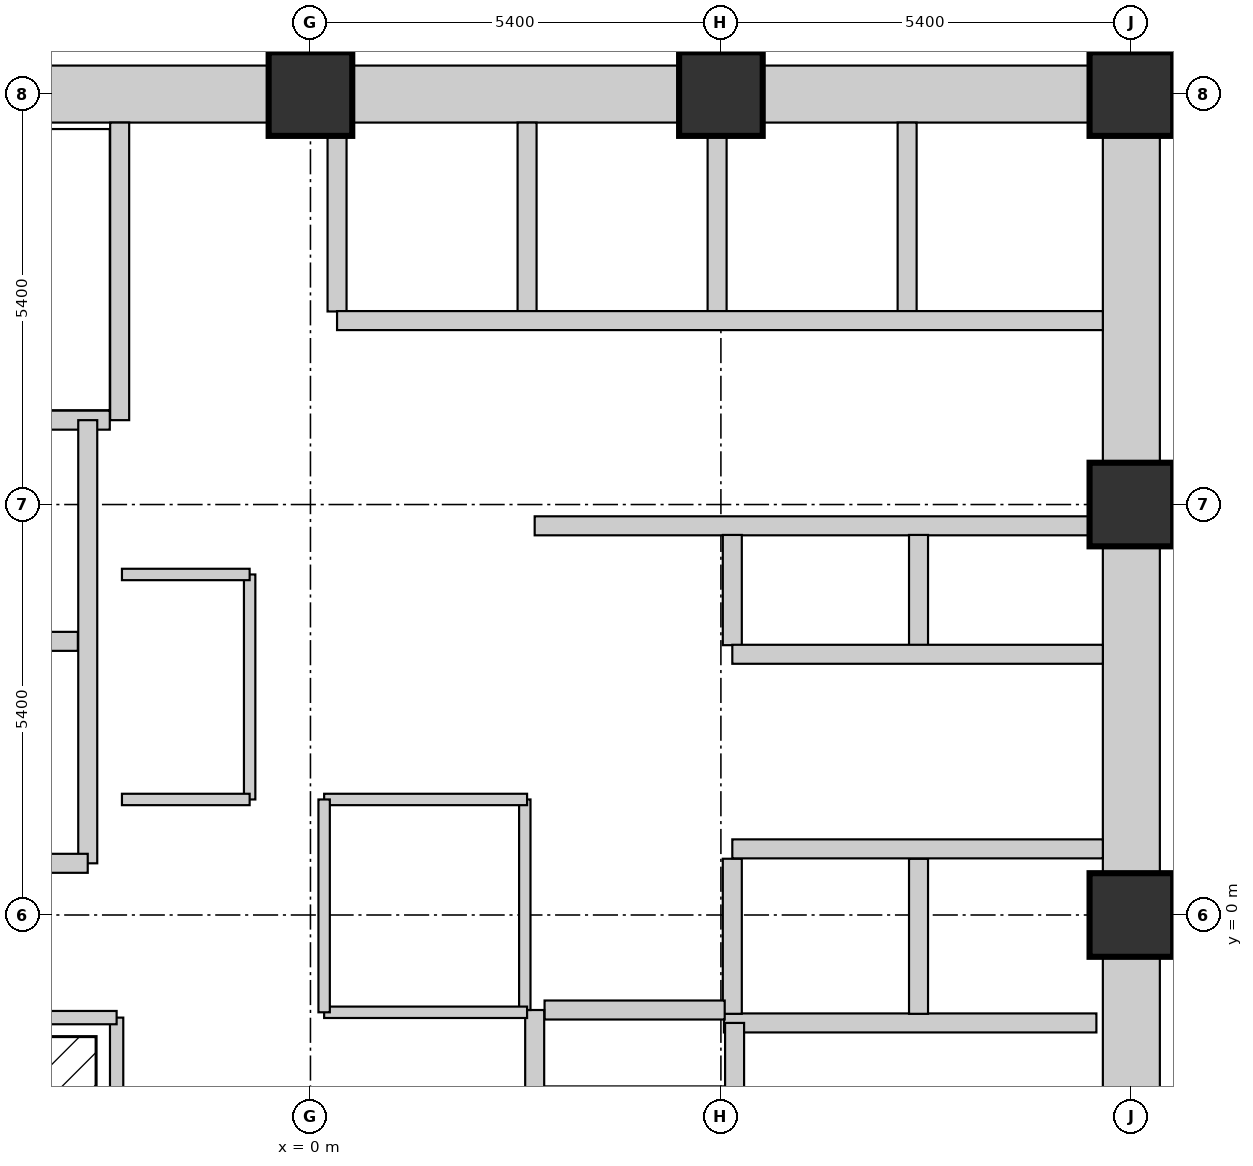
"""IFC4 building model, lengths in metres.
Left out: names, types, materials, properties, quantities, classifications, styles, units other than length and angle.
Written with IfcOpenShell. Run it as: python <this file> out.ifc"""

import sys

from ifc_helpers import new_model, si_unit, direction, frame, frame_2d, origin, origin_2d, place, context, subcontext, project, spatial, rectangle, extrude, element, fill, save


model = new_model("IFC4")
c1 = context("Model", 3, precision=1e-05, world=origin(), true_north=direction((0.0, 1.0)))
c2 = subcontext(c1, "Body", "Model", "MODEL_VIEW")
j1 = project(units=[si_unit("LENGTHUNIT", "METRE"), si_unit("PLANEANGLEUNIT", "RADIAN")], contexts=[c1])
p1 = place(None, origin())
s1 = spatial("IfcSite", under=j1, at=p1, CompositionType="ELEMENT")
p2 = place(p1, origin())
s2 = spatial("IfcBuilding", under=s1, at=p2, CompositionType="ELEMENT")
p3 = place(p2, frame((0.0, 0.0, 83.25)))
s3 = spatial("IfcBuildingStorey", under=s2, at=p3, CompositionType="ELEMENT", Elevation=83.25)
for number, where, z_axis, x_axis in (
    (1, (0.0, 10.8, 0.0), (0.0, 0.0, 1.0), (1.0, 0.0, 0.0)),
    (2, (5.4, 10.8, 0.0), (0.0, 0.0, 1.0), (1.0, 0.0, 0.0)),
    (3, (10.8, 0.0, 0.0), (0.0, 0.0, 1.0), (1.0, 0.0, 0.0)),
    (4, (10.8, 5.4, 0.0), (0.0, 0.0, 1.0), (1.0, 0.0, 0.0)),
    (5, (10.8, 10.8, 0.0), (0.0, 0.0, 1.0), (1.0, 0.0, 0.0)),
):
    element("IfcColumn", number, at=place(p3, frame(where, z_axis=z_axis, x_axis=x_axis)), inside=s3, PredefinedType="COLUMN", context=c2, shape_type="SweptSolid", body=[
        extrude(rectangle(XDim=1.1, YDim=1.1, at=origin_2d()), origin(), (0.0, 0.0, 1.0), 3.75),
    ])
p4 = place(p3, frame((-4.84, 10.8, 0.0), z_axis=(0.0, 0.0, 1.0), x_axis=(1.0, 0.0, 0.0)))
e6 = element("IfcWall", 6, at=p4, inside=s3, PredefinedType="SHEAR", context=c2, shape_type="SweptSolid", body=[
    extrude(rectangle(XDim=4.28, YDim=0.75, at=frame_2d((2.14, 0.0))), origin(), (0.0, 0.0, 1.0), 3.75),
])
p5 = place(p4, frame((2.93, 0.0, 0.0)))
e7 = element("IfcOpeningElement", 7, at=p5, cuts=e6, PredefinedType="OPENING", context=c2, shape_type="SweptSolid", body=[
    extrude(rectangle(XDim=1.1, YDim=2.1, at=frame_2d((0.55, 1.05))), frame((0.0, 0.385, 0.0), z_axis=(0.0, -1.0, 0.0), x_axis=(1.0, 0.0, 0.0)), (0.0, 0.0, 1.0), 0.77),
])
p6 = place(p3, frame((10.8, -4.84, 0.0), z_axis=(0.0, 0.0, 1.0), x_axis=(0.0, 1.0, 0.0)))
e8 = element("IfcWall", 8, at=p6, inside=s3, PredefinedType="SHEAR", context=c2, shape_type="SweptSolid", body=[
    extrude(rectangle(XDim=4.28, YDim=0.75, at=frame_2d((2.14, 0.0))), origin(), (0.0, 0.0, 1.0), 3.75),
])
p7 = place(p6, frame((1.59, 0.0, 0.0)))
e9 = element("IfcOpeningElement", 9, at=p7, cuts=e8, PredefinedType="OPENING", context=c2, shape_type="SweptSolid", body=[
    extrude(rectangle(XDim=1.1, YDim=2.1, at=frame_2d((0.55, 1.05))), frame((0.0, 0.385, 0.0), z_axis=(0.0, -1.0, 0.0), x_axis=(1.0, 0.0, 0.0)), (0.0, 0.0, 1.0), 0.77),
])
p8 = place(p3, frame((0.56, 10.8, 0.0), z_axis=(0.0, 0.0, 1.0), x_axis=(1.0, 0.0, 0.0)))
e10 = element("IfcWall", 10, at=p8, inside=s3, PredefinedType="SHEAR", context=c2, shape_type="SweptSolid", body=[
    extrude(rectangle(XDim=4.28, YDim=0.75, at=frame_2d((2.14, 0.0))), origin(), (0.0, 0.0, 1.0), 3.75),
])
p9 = place(p3, frame((10.8, 0.56, 0.0), z_axis=(0.0, 0.0, 1.0), x_axis=(0.0, 1.0, 0.0)))
e11 = element("IfcWall", 11, at=p9, inside=s3, PredefinedType="SHEAR", context=c2, shape_type="SweptSolid", body=[
    extrude(rectangle(XDim=4.28, YDim=0.75, at=frame_2d((2.14, 0.0))), origin(), (0.0, 0.0, 1.0), 3.75),
])
p10 = place(p9, frame((1.59, 0.0, 0.0)))
e12 = element("IfcOpeningElement", 12, at=p10, cuts=e11, PredefinedType="OPENING", context=c2, shape_type="SweptSolid", body=[
    extrude(rectangle(XDim=1.1, YDim=2.1, at=frame_2d((0.55, 1.05))), frame((0.0, 0.385, 0.0), z_axis=(0.0, -1.0, 0.0), x_axis=(1.0, 0.0, 0.0)), (0.0, 0.0, 1.0), 0.77),
])
for number, where, z_axis, x_axis in (
    (13, (5.96, 10.8, 0.0), (0.0, 0.0, 1.0), (1.0, 0.0, 0.0)),
    (14, (10.8, 5.96, 0.0), (0.0, 0.0, 1.0), (0.0, 1.0, 0.0)),
):
    element("IfcWall", number, at=place(p3, frame(where, z_axis=z_axis, x_axis=x_axis)), inside=s3, PredefinedType="SHEAR", context=c2, shape_type="SweptSolid", body=[
        extrude(rectangle(XDim=4.28, YDim=0.75, at=frame_2d((2.14, 0.0))), origin(), (0.0, 0.0, 1.0), 3.75),
    ])
p11 = place(p3, frame((5.44, -1.42, 0.0), z_axis=(0.0, 0.0, 1.0), x_axis=(1.0, 0.0, 0.0)))
e15 = element("IfcWall", 15, at=p11, inside=s3, PredefinedType="SHEAR", context=c2, shape_type="SweptSolid", body=[
    extrude(rectangle(XDim=4.9, YDim=0.25, at=frame_2d((2.45, 0.0))), origin(), (0.0, 0.0, 1.0), 3.75),
])
p12 = place(p3, frame((5.58, -6.51, 0.0), z_axis=(0.0, 0.0, 1.0), x_axis=(0.0, 1.0, 0.0)))
e16 = element("IfcWall", 16, at=p12, inside=s3, PredefinedType="SHEAR", context=c2, shape_type="SweptSolid", body=[
    extrude(rectangle(XDim=5.09, YDim=0.25, at=frame_2d((2.545, 0.0))), origin(), (0.0, 0.0, 1.0), 3.75),
])
p13 = place(p12, frame((0.85, 0.0, 0.0)))
e17 = element("IfcOpeningElement", 17, at=p13, cuts=e16, PredefinedType="OPENING", context=c2, shape_type="SweptSolid", body=[
    extrude(rectangle(XDim=1.1, YDim=2.1, at=frame_2d((0.55, 1.05))), frame((0.0, 0.135, 0.0), z_axis=(0.0, -1.0, 0.0), x_axis=(1.0, 0.0, 0.0)), (0.0, 0.0, 1.0), 0.27),
])
p14 = place(p3, frame((2.85, 7.94, 0.0), z_axis=(0.0, 0.0, 1.0), x_axis=(0.0, 1.0, 0.0)))
e18 = element("IfcWall", 18, at=p14, inside=s3, PredefinedType="SHEAR", context=c2, shape_type="SweptSolid", body=[
    extrude(rectangle(XDim=2.485, YDim=0.25, at=frame_2d((1.243, 0.0))), origin(), (0.0, 0.0, 1.0), 3.75),
])
for number, where, z_axis, x_axis in (
    (19, (0.35, 7.94, 0.0), (0.0, 0.0, 1.0), (0.0, 1.0, 0.0)),
    (20, (5.35, 7.94, 0.0), (0.0, 0.0, 1.0), (0.0, 1.0, 0.0)),
):
    element("IfcWall", number, at=place(p3, frame(where, z_axis=z_axis, x_axis=x_axis)), inside=s3, PredefinedType="SHEAR", context=c2, shape_type="SweptSolid", body=[
        extrude(rectangle(XDim=2.31, YDim=0.25, at=frame_2d((1.155, 0.0))), origin(), (0.0, 0.0, 1.0), 3.75),
    ])
p15 = place(p3, frame((7.85, 7.94, 0.0), z_axis=(0.0, 0.0, 1.0), x_axis=(0.0, 1.0, 0.0)))
e21 = element("IfcWall", 21, at=p15, inside=s3, PredefinedType="SHEAR", context=c2, shape_type="SweptSolid", body=[
    extrude(rectangle(XDim=2.485, YDim=0.25, at=frame_2d((1.243, 0.0))), origin(), (0.0, 0.0, 1.0), 3.75),
])
p16 = place(p3, frame((0.35, 7.82, 0.0), z_axis=(0.0, 0.0, 1.0), x_axis=(1.0, 0.0, 0.0)))
e22 = element("IfcWall", 22, at=p16, inside=s3, PredefinedType="SHEAR", context=c2, shape_type="SweptSolid", body=[
    extrude(rectangle(XDim=10.075, YDim=0.25, at=frame_2d((5.038, 0.0))), origin(), (0.0, 0.0, 1.0), 3.75),
])
p17 = place(p16, frame((0.7, 0.0, 0.0)))
e23 = element("IfcOpeningElement", 23, at=p17, cuts=e22, PredefinedType="OPENING", context=c2, shape_type="SweptSolid", body=[
    extrude(rectangle(XDim=1.1, YDim=2.1, at=frame_2d((0.55, 1.05))), frame((0.0, 0.135, 0.0), z_axis=(0.0, -1.0, 0.0), x_axis=(1.0, 0.0, 0.0)), (0.0, 0.0, 1.0), 0.27),
])
p18 = place(p16, frame((3.2, 0.0, 0.0)))
e24 = element("IfcOpeningElement", 24, at=p18, cuts=e22, PredefinedType="OPENING", context=c2, shape_type="SweptSolid", body=[
    extrude(rectangle(XDim=1.1, YDim=2.1, at=frame_2d((0.55, 1.05))), frame((0.0, 0.135, 0.0), z_axis=(0.0, -1.0, 0.0), x_axis=(1.0, 0.0, 0.0)), (0.0, 0.0, 1.0), 0.27),
])
p19 = place(p16, frame((5.7, 0.0, 0.0)))
e25 = element("IfcOpeningElement", 25, at=p19, cuts=e22, PredefinedType="OPENING", context=c2, shape_type="SweptSolid", body=[
    extrude(rectangle(XDim=1.1, YDim=2.1, at=frame_2d((0.55, 1.05))), frame((0.0, 0.135, 0.0), z_axis=(0.0, -1.0, 0.0), x_axis=(1.0, 0.0, 0.0)), (0.0, 0.0, 1.0), 0.27),
])
p20 = place(p16, frame((8.2, 0.0, 0.0)))
e26 = element("IfcOpeningElement", 26, at=p20, cuts=e22, PredefinedType="OPENING", context=c2, shape_type="SweptSolid", body=[
    extrude(rectangle(XDim=1.1, YDim=2.1, at=frame_2d((0.55, 1.05))), frame((0.0, 0.135, 0.0), z_axis=(0.0, -1.0, 0.0), x_axis=(1.0, 0.0, 0.0)), (0.0, 0.0, 1.0), 0.27),
])
p21 = place(p3, frame((2.95, 5.12, 0.0), z_axis=(0.0, 0.0, 1.0), x_axis=(1.0, 0.0, 0.0)))
e27 = element("IfcWall", 27, at=p21, inside=s3, PredefinedType="SHEAR", context=c2, shape_type="SweptSolid", body=[
    extrude(rectangle(XDim=7.3, YDim=0.25, at=frame_2d((3.65, 0.0))), origin(), (0.0, 0.0, 1.0), 3.75),
])
for number, where, z_axis, x_axis in (
    (28, (5.55, 3.55, 0.0), (0.0, 0.0, 1.0), (0.0, 1.0, 0.0)),
    (29, (8.0, 3.55, 0.0), (0.0, 0.0, 1.0), (0.0, 1.0, 0.0)),
):
    element("IfcWall", number, at=place(p3, frame(where, z_axis=z_axis, x_axis=x_axis)), inside=s3, PredefinedType="SHEAR", context=c2, shape_type="SweptSolid", body=[
        extrude(rectangle(XDim=1.45, YDim=0.25, at=frame_2d((0.725, 0.0))), origin(), (0.0, 0.0, 1.0), 3.75),
    ])
for number, where, z_axis, x_axis in (
    (30, (5.55, -1.3, 0.0), (0.0, 0.0, 1.0), (0.0, 1.0, 0.0)),
    (31, (8.0, -1.3, 0.0), (0.0, 0.0, 1.0), (0.0, 1.0, 0.0)),
):
    element("IfcWall", number, at=place(p3, frame(where, z_axis=z_axis, x_axis=x_axis)), inside=s3, PredefinedType="SHEAR", context=c2, shape_type="SweptSolid", body=[
        extrude(rectangle(XDim=2.04, YDim=0.25, at=frame_2d((1.02, 0.0))), origin(), (0.0, 0.0, 1.0), 3.75),
    ])
for number, where, z_axis, x_axis in (
    (32, (5.55, 3.43, 0.0), (0.0, 0.0, 1.0), (1.0, 0.0, 0.0)),
    (33, (5.55, 0.87, 0.0), (0.0, 0.0, 1.0), (1.0, 0.0, 0.0)),
):
    element("IfcWall", number, at=place(p3, frame(where, z_axis=z_axis, x_axis=x_axis)), inside=s3, PredefinedType="SHEAR", context=c2, shape_type="SweptSolid", body=[
        extrude(rectangle(XDim=4.875, YDim=0.25, at=frame_2d((2.438, 0.0))), origin(), (0.0, 0.0, 1.0), 3.75),
    ])
p22 = place(p3, frame((3.08, -1.25, 0.0), z_axis=(0.0, 0.0, 1.0), x_axis=(1.0, 0.0, 0.0)))
e34 = element("IfcWall", 34, at=p22, inside=s3, PredefinedType="SHEAR", context=c2, shape_type="SweptSolid", body=[
    extrude(rectangle(XDim=2.37, YDim=0.25, at=frame_2d((1.185, 0.0))), origin(), (0.0, 0.0, 1.0), 3.75),
])
p23 = place(p3, frame((2.95, -3.65, 0.0), z_axis=(0.0, 0.0, 1.0), x_axis=(0.0, 1.0, 0.0)))
e35 = element("IfcWall", 35, at=p23, inside=s3, PredefinedType="SHEAR", context=c2, shape_type="SweptSolid", body=[
    extrude(rectangle(XDim=2.4, YDim=0.25, at=frame_2d((1.2, 0.0))), origin(), (0.0, 0.0, 1.0), 3.75),
])
p24 = place(p23, frame((0.775, 0.0, 0.0)))
e36 = element("IfcOpeningElement", 36, at=p24, cuts=e35, PredefinedType="OPENING", context=c2, shape_type="SweptSolid", body=[
    extrude(rectangle(XDim=0.85, YDim=2.1, at=frame_2d((0.425, 1.05))), frame((0.0, 0.135, 0.0), z_axis=(0.0, -1.0, 0.0), x_axis=(1.0, 0.0, 0.0)), (0.0, 0.0, 1.0), 0.27),
])
p25 = place(p3, frame((-2.51, 6.51, 0.0), z_axis=(0.0, 0.0, 1.0), x_axis=(0.0, 1.0, 0.0)))
e37 = element("IfcWall", 37, at=p25, inside=s3, PredefinedType="SHEAR", context=c2, shape_type="SweptSolid", body=[
    extrude(rectangle(XDim=3.915, YDim=0.25, at=frame_2d((1.958, 0.0))), origin(), (0.0, 0.0, 1.0), 3.75),
])
p26 = place(p3, frame((-10.34, 6.51, 0.0), z_axis=(0.0, 0.0, 1.0), x_axis=(1.0, 0.0, 0.0)))
e38 = element("IfcWall", 38, at=p26, inside=s3, PredefinedType="SHEAR", context=c2, shape_type="SweptSolid", body=[
    extrude(rectangle(XDim=7.7, YDim=0.25, at=frame_2d((3.85, 0.0))), origin(), (0.0, 0.0, 1.0), 3.75),
])
p27 = place(p26, frame((0.35, 0.0, 0.0)))
e39 = element("IfcOpeningElement", 39, at=p27, cuts=e38, PredefinedType="OPENING", context=c2, shape_type="SweptSolid", body=[
    extrude(rectangle(XDim=1.1, YDim=2.1, at=frame_2d((0.55, 1.05))), frame((0.0, 0.135, 0.0), z_axis=(0.0, -1.0, 0.0), x_axis=(1.0, 0.0, 0.0)), (0.0, 0.0, 1.0), 0.27),
])
p28 = place(p3, frame((-2.93, 0.68, 0.0), z_axis=(0.0, 0.0, 1.0), x_axis=(0.0, 1.0, 0.0)))
e40 = element("IfcWall", 40, at=p28, inside=s3, PredefinedType="SHEAR", context=c2, shape_type="SweptSolid", body=[
    extrude(rectangle(XDim=5.83, YDim=0.25, at=frame_2d((2.915, 0.0))), origin(), (0.0, 0.0, 1.0), 3.75),
])
p29 = place(p28, frame((0.75, 0.0, 0.0)))
e41 = element("IfcOpeningElement", 41, at=p29, cuts=e40, PredefinedType="OPENING", context=c2, shape_type="SweptSolid", body=[
    extrude(rectangle(XDim=1.2, YDim=2.1, at=frame_2d((0.6, 1.05))), frame((0.0, 0.135, 0.0), z_axis=(0.0, -1.0, 0.0), x_axis=(1.0, 0.0, 0.0)), (0.0, 0.0, 1.0), 0.27),
])
p30 = place(p3, frame((-5.45, 3.6, 0.0), z_axis=(0.0, 0.0, 1.0), x_axis=(1.0, 0.0, 0.0)))
e42 = element("IfcWall", 42, at=p30, inside=s3, PredefinedType="SHEAR", context=c2, shape_type="SweptSolid", body=[
    extrude(rectangle(XDim=2.39, YDim=0.25, at=frame_2d((1.195, 0.0))), origin(), (0.0, 0.0, 1.0), 3.75),
])
p31 = place(p3, frame((-5.58, 0.68, 0.0), z_axis=(0.0, 0.0, 1.0), x_axis=(1.0, 0.0, 0.0)))
e43 = element("IfcWall", 43, at=p31, inside=s3, PredefinedType="SHEAR", context=c2, shape_type="SweptSolid", body=[
    extrude(rectangle(XDim=2.65, YDim=0.25, at=frame_2d((1.325, 0.0))), origin(), (0.0, 0.0, 1.0), 3.75),
])
p32 = place(p3, frame((2.82, -1.25, 0.0), z_axis=(0.0, 0.0, 1.0), x_axis=(0.0, 1.0, 0.0)))
e44 = element("IfcWall", 44, at=p32, inside=s3, PredefinedType="PARTITIONING", context=c2, shape_type="SweptSolid", body=[
    extrude(rectangle(XDim=2.77, YDim=0.15, at=frame_2d((1.385, 0.0))), origin(), (0.0, 0.0, 1.0), 3.57),
])
for number, where, z_axis, x_axis in (
    (45, (0.18, 1.52, 0.0), (0.0, 0.0, 1.0), (1.0, 0.0, 0.0)),
    (46, (0.18, -1.28, 0.0), (0.0, 0.0, 1.0), (1.0, 0.0, 0.0)),
):
    element("IfcWall", number, at=place(p3, frame(where, z_axis=z_axis, x_axis=x_axis)), inside=s3, PredefinedType="PARTITIONING", context=c2, shape_type="SweptSolid", body=[
        extrude(rectangle(XDim=2.67, YDim=0.15, at=frame_2d((1.335, 0.0))), origin(), (0.0, 0.0, 1.0), 3.57),
    ])
p33 = place(p3, frame((0.18, -1.28, 0.0), z_axis=(0.0, 0.0, 1.0), x_axis=(0.0, 1.0, 0.0)))
e47 = element("IfcWall", 47, at=p33, inside=s3, PredefinedType="PARTITIONING", context=c2, shape_type="SweptSolid", body=[
    extrude(rectangle(XDim=2.8, YDim=0.15, at=frame_2d((1.4, 0.0))), origin(), (0.0, 0.0, 1.0), 3.57),
])
p34 = place(p33, frame((0.85, 0.0, 0.0)))
e48 = element("IfcOpeningElement", 48, at=p34, cuts=e47, PredefinedType="OPENING", context=c2, shape_type="SweptSolid", body=[
    extrude(rectangle(XDim=0.85, YDim=2.1, at=frame_2d((0.425, 1.05))), frame((0.0, 0.085, 0.0), z_axis=(0.0, -1.0, 0.0), x_axis=(1.0, 0.0, 0.0)), (0.0, 0.0, 1.0), 0.17),
])
p35 = place(p3, frame((-2.55, -6.51, 0.0), z_axis=(0.0, 0.0, 1.0), x_axis=(0.0, 1.0, 0.0)))
e49 = element("IfcWall", 49, at=p35, inside=s3, PredefinedType="PARTITIONING", context=c2, shape_type="SweptSolid", body=[
    extrude(rectangle(XDim=5.16, YDim=0.175, at=frame_2d((2.58, 0.0))), origin(), (0.0, 0.0, 1.0), 3.57),
])
p36 = place(p35, frame((3.45, 0.0, 0.0)))
e50 = element("IfcOpeningElement", 50, at=p36, cuts=e49, PredefinedType="OPENING", context=c2, shape_type="SweptSolid", body=[
    extrude(rectangle(XDim=0.85, YDim=2.1, at=frame_2d((0.425, 1.05))), frame((0.0, 0.097, 0.0), z_axis=(0.0, -1.0, 0.0), x_axis=(1.0, 0.0, 0.0)), (0.0, 0.0, 1.0), 0.195),
])
p37 = place(p3, frame((-7.18, -1.35, 0.0), z_axis=(0.0, 0.0, 1.0), x_axis=(1.0, 0.0, 0.0)))
e51 = element("IfcWall", 51, at=p37, inside=s3, PredefinedType="PARTITIONING", context=c2, shape_type="SweptSolid", body=[
    extrude(rectangle(XDim=4.63, YDim=0.175, at=frame_2d((2.315, 0.0))), origin(), (0.0, 0.0, 1.0), 3.57),
])
p38 = place(p3, frame((-0.8, 1.52, 0.0), z_axis=(0.0, 0.0, 1.0), x_axis=(0.0, 1.0, 0.0)))
e52 = element("IfcWall", 52, at=p38, inside=s3, PredefinedType="PARTITIONING", context=c2, shape_type="SweptSolid", body=[
    extrude(rectangle(XDim=2.96, YDim=0.15, at=frame_2d((1.48, 0.0))), origin(), (0.0, 0.0, 1.0), 3.57),
])
p39 = place(p38, frame((0.95, 0.0, 0.0)))
e53 = element("IfcOpeningElement", 53, at=p39, cuts=e52, PredefinedType="OPENING", context=c2, shape_type="SweptSolid", body=[
    extrude(rectangle(XDim=0.85, YDim=2.1, at=frame_2d((0.425, 1.05))), frame((0.0, 0.085, 0.0), z_axis=(0.0, -1.0, 0.0), x_axis=(1.0, 0.0, 0.0)), (0.0, 0.0, 1.0), 0.17),
])
for number, where, z_axis, x_axis in (
    (54, (-2.48, 4.48, 0.0), (0.0, 0.0, 1.0), (1.0, 0.0, 0.0)),
    (55, (-2.48, 1.52, 0.0), (0.0, 0.0, 1.0), (1.0, 0.0, 0.0)),
):
    element("IfcWall", number, at=place(p3, frame(where, z_axis=z_axis, x_axis=x_axis)), inside=s3, PredefinedType="PARTITIONING", context=c2, shape_type="SweptSolid", body=[
        extrude(rectangle(XDim=1.68, YDim=0.15, at=frame_2d((0.84, 0.0))), origin(), (0.0, 0.0, 1.0), 3.57),
    ])
p40 = place(p34, origin())
e56 = element("IfcDoor", 56, at=p40, inside=s3, OperationType="SINGLE_SWING_RIGHT", PredefinedType="DOOR", context=c2, shape_type="SweptSolid", body=[
    extrude(rectangle(XDim=0.85, YDim=2.1, at=frame_2d((0.425, 1.05))), frame((0.0, 0.025, 0.0), z_axis=(0.0, -1.0, 0.0), x_axis=(1.0, 0.0, 0.0)), (0.0, 0.0, 1.0), 0.05),
])
fill(e48, e56)
p41 = place(p39, origin())
e57 = element("IfcDoor", 57, at=p41, inside=s3, OperationType="SINGLE_SWING_LEFT", PredefinedType="DOOR", context=c2, shape_type="SweptSolid", body=[
    extrude(rectangle(XDim=0.85, YDim=2.1, at=frame_2d((0.425, 1.05))), frame((0.0, 0.025, 0.0), z_axis=(0.0, -1.0, 0.0), x_axis=(1.0, 0.0, 0.0)), (0.0, 0.0, 1.0), 0.05),
])
fill(e53, e57)
p42 = place(p24, origin())
e58 = element("IfcDoor", 58, at=p42, inside=s3, OperationType="SINGLE_SWING_LEFT", PredefinedType="DOOR", context=c2, shape_type="SweptSolid", body=[
    extrude(rectangle(XDim=0.85, YDim=2.1, at=frame_2d((0.425, 1.05))), frame((0.0, 0.025, 0.0), z_axis=(0.0, -1.0, 0.0), x_axis=(1.0, 0.0, 0.0)), (0.0, 0.0, 1.0), 0.05),
])
fill(e36, e58)
p43 = place(p5, origin())
e59 = element("IfcDoor", 59, at=p43, inside=s3, OperationType="SINGLE_SWING_LEFT", PredefinedType="DOOR", context=c2, shape_type="SweptSolid", body=[
    extrude(rectangle(XDim=1.1, YDim=2.1, at=frame_2d((0.55, 1.05))), frame((0.0, 0.025, 0.0), z_axis=(0.0, -1.0, 0.0), x_axis=(1.0, 0.0, 0.0)), (0.0, 0.0, 1.0), 0.05),
])
fill(e7, e59)
p44 = place(p7, origin())
e60 = element("IfcDoor", 60, at=p44, inside=s3, OperationType="SINGLE_SWING_RIGHT", PredefinedType="DOOR", context=c2, shape_type="SweptSolid", body=[
    extrude(rectangle(XDim=1.1, YDim=2.1, at=frame_2d((0.55, 1.05))), frame((0.0, 0.025, 0.0), z_axis=(0.0, -1.0, 0.0), x_axis=(1.0, 0.0, 0.0)), (0.0, 0.0, 1.0), 0.05),
])
fill(e9, e60)
p45 = place(p29, origin())
e61 = element("IfcDoor", 61, at=p45, inside=s3, OperationType="SLIDING_TO_LEFT", PredefinedType="DOOR", context=c2, shape_type="SweptSolid", body=[
    extrude(rectangle(XDim=1.2, YDim=2.1, at=frame_2d((0.6, 1.05))), frame((0.0, 0.025, 0.0), z_axis=(0.0, -1.0, 0.0), x_axis=(1.0, 0.0, 0.0)), (0.0, 0.0, 1.0), 0.05),
])
fill(e41, e61)
p46 = place(p17, origin())
e62 = element("IfcDoor", 62, at=p46, inside=s3, OperationType="SLIDING_TO_LEFT", PredefinedType="DOOR", context=c2, shape_type="SweptSolid", body=[
    extrude(rectangle(XDim=1.1, YDim=2.1, at=frame_2d((0.55, 1.05))), frame((0.0, 0.025, 0.0), z_axis=(0.0, -1.0, 0.0), x_axis=(1.0, 0.0, 0.0)), (0.0, 0.0, 1.0), 0.05),
])
fill(e23, e62)
p47 = place(p18, origin())
e63 = element("IfcDoor", 63, at=p47, inside=s3, OperationType="SLIDING_TO_LEFT", PredefinedType="DOOR", context=c2, shape_type="SweptSolid", body=[
    extrude(rectangle(XDim=1.1, YDim=2.1, at=frame_2d((0.55, 1.05))), frame((0.0, 0.025, 0.0), z_axis=(0.0, -1.0, 0.0), x_axis=(1.0, 0.0, 0.0)), (0.0, 0.0, 1.0), 0.05),
])
fill(e24, e63)
p48 = place(p19, origin())
e64 = element("IfcDoor", 64, at=p48, inside=s3, OperationType="SLIDING_TO_LEFT", PredefinedType="DOOR", context=c2, shape_type="SweptSolid", body=[
    extrude(rectangle(XDim=1.1, YDim=2.1, at=frame_2d((0.55, 1.05))), frame((0.0, 0.025, 0.0), z_axis=(0.0, -1.0, 0.0), x_axis=(1.0, 0.0, 0.0)), (0.0, 0.0, 1.0), 0.05),
])
fill(e25, e64)
p49 = place(p20, origin())
e65 = element("IfcDoor", 65, at=p49, inside=s3, OperationType="SLIDING_TO_LEFT", PredefinedType="DOOR", context=c2, shape_type="SweptSolid", body=[
    extrude(rectangle(XDim=1.1, YDim=2.1, at=frame_2d((0.55, 1.05))), frame((0.0, 0.025, 0.0), z_axis=(0.0, -1.0, 0.0), x_axis=(1.0, 0.0, 0.0)), (0.0, 0.0, 1.0), 0.05),
])
fill(e26, e65)
p50 = place(p10, origin())
e66 = element("IfcDoor", 66, at=p50, inside=s3, OperationType="SINGLE_SWING_LEFT", PredefinedType="DOOR", context=c2, shape_type="SweptSolid", body=[
    extrude(rectangle(XDim=1.1, YDim=2.1, at=frame_2d((0.55, 1.05))), frame((0.0, 0.025, 0.0), z_axis=(0.0, -1.0, 0.0), x_axis=(1.0, 0.0, 0.0)), (0.0, 0.0, 1.0), 0.05),
])
fill(e12, e66)
p51 = place(p36, origin())
e67 = element("IfcDoor", 67, at=p51, inside=s3, OperationType="SINGLE_SWING_LEFT", PredefinedType="DOOR", context=c2, shape_type="SweptSolid", body=[
    extrude(rectangle(XDim=0.85, YDim=2.1, at=frame_2d((0.425, 1.05))), frame((0.0, 0.025, 0.0), z_axis=(0.0, -1.0, 0.0), x_axis=(1.0, 0.0, 0.0)), (0.0, 0.0, 1.0), 0.05),
])
fill(e50, e67)
save(model, sys.argv[1])
